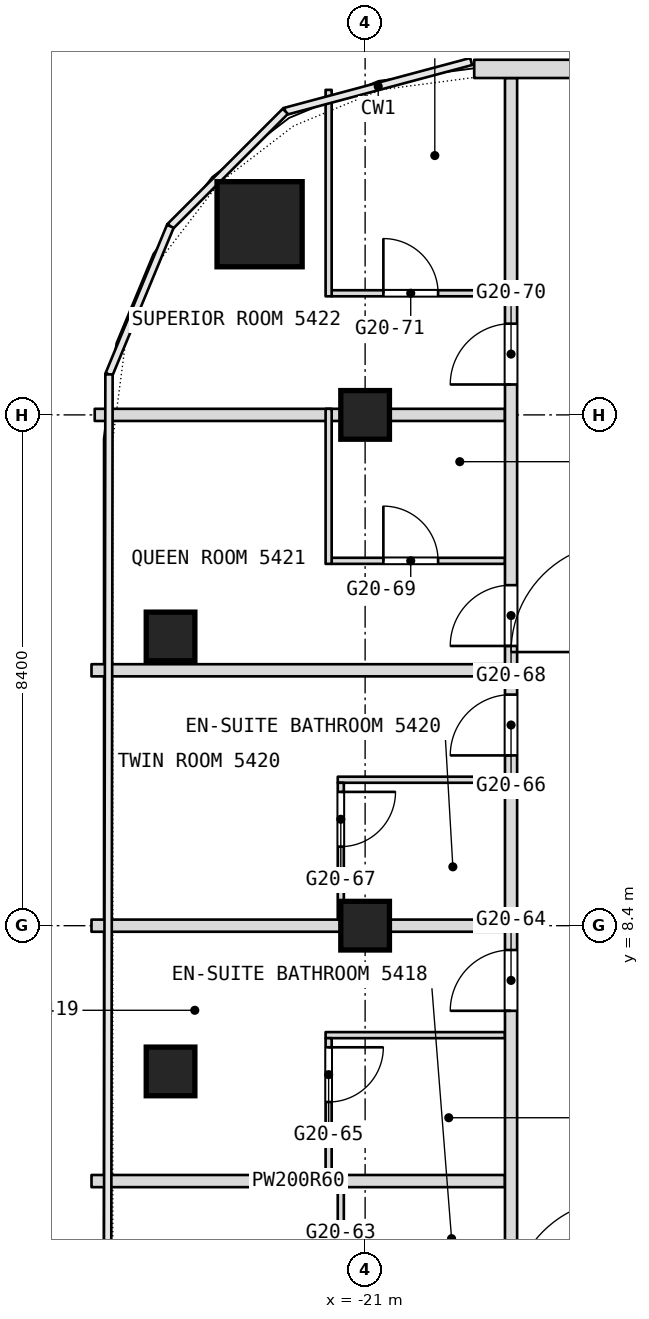
"""IFC4 building model, lengths in metres.
Left out: names, types, materials, properties, quantities, classifications, styles, units other than length and angle.
Written with IfcOpenShell. Run it as: python <this file> out.ifc"""

import sys

from ifc_helpers import new_model, si_unit, direction, frame, frame_2d, origin, origin_2d, place, context, subcontext, project, spatial, rectangle, extrude, element, fill, save


model = new_model("IFC4")
c1 = context("Model", 3, precision=1e-05, world=origin(), true_north=direction((0.0, 1.0)))
c2 = subcontext(c1, "Body", "Model", "MODEL_VIEW")
j1 = project(units=[si_unit("LENGTHUNIT", "METRE"), si_unit("PLANEANGLEUNIT", "RADIAN")], contexts=[c1])
p1 = place(None, origin())
s1 = spatial("IfcSite", under=j1, at=p1, CompositionType="ELEMENT")
p2 = place(p1, origin())
s2 = spatial("IfcBuilding", under=s1, at=p2, CompositionType="ELEMENT")
p3 = place(p2, frame((0.0, 0.0, 230.9)))
s3 = spatial("IfcBuildingStorey", under=s2, at=p3, CompositionType="ELEMENT", Elevation=230.9)
p4 = place(p3, frame((-22.736, 19.936, 0.0), z_axis=(0.0, 0.0, 1.0), x_axis=(1.0, 0.0, 0.0)))
e1 = element("IfcColumn", 1, at=p4, inside=s3, PredefinedType="COLUMN", context=c2, shape_type="SweptSolid", body=[
    extrude(rectangle(XDim=1.4, YDim=1.4, at=origin_2d()), origin(), (0.0, 0.0, 1.0), 3.6),
])
for number, where, z_axis, x_axis in (
    (2, (-21.0, 8.4, 0.0), (0.0, 0.0, 1.0), (1.0, 0.0, 0.0)),
    (3, (-21.0, 16.8, 0.0), (0.0, 0.0, 1.0), (1.0, 0.0, 0.0)),
    (4, (-24.2, 6.003, 0.0), (0.0, 0.0, 1.0), (1.0, 0.0, 0.0)),
    (5, (-24.2, 13.156, 0.0), (0.0, 0.0, 1.0), (1.0, 0.0, 0.0)),
):
    element("IfcColumn", number, at=place(p3, frame(where, z_axis=z_axis, x_axis=x_axis)), inside=s3, PredefinedType="COLUMN", context=c2, shape_type="SweptSolid", body=[
        extrude(rectangle(XDim=0.8, YDim=0.8, at=origin_2d()), origin(), (0.0, 0.0, 1.0), 3.6),
    ])
p5 = place(p3, frame((-25.5, 4.2, 0.0), z_axis=(0.0, 0.0, 1.0), x_axis=(1.0, 0.0, 0.0)))
e6 = element("IfcWall", 6, at=p5, inside=s3, PredefinedType="PARTITIONING", context=c2, shape_type="SweptSolid", body=[
    extrude(rectangle(XDim=6.8, YDim=0.2, at=frame_2d((3.4, 0.0))), origin(), (0.0, 0.0, 1.0), 3.34),
])
p6 = place(p3, frame((-21.65, 6.6, 0.0), z_axis=(0.0, 0.0, 1.0), x_axis=(1.0, 0.0, 0.0)))
e7 = element("IfcWall", 7, at=p6, inside=s3, PredefinedType="PARTITIONING", context=c2, shape_type="SweptSolid", body=[
    extrude(rectangle(XDim=2.95, YDim=0.1, at=frame_2d((1.475, 0.0))), origin(), (0.0, 0.0, 1.0), 3.34),
])
p7 = place(p3, frame((-25.5, 8.4, 0.0), z_axis=(0.0, 0.0, 1.0), x_axis=(1.0, 0.0, 0.0)))
e8 = element("IfcWall", 8, at=p7, inside=s3, PredefinedType="PARTITIONING", context=c2, shape_type="SweptSolid", body=[
    extrude(rectangle(XDim=6.8, YDim=0.2, at=frame_2d((3.4, 0.0))), origin(), (0.0, 0.0, 1.0), 2.94),
])
p8 = place(p3, frame((-21.45, 10.8, 0.0), z_axis=(0.0, 0.0, 1.0), x_axis=(1.0, 0.0, 0.0)))
e9 = element("IfcWall", 9, at=p8, inside=s3, PredefinedType="PARTITIONING", context=c2, shape_type="SweptSolid", body=[
    extrude(rectangle(XDim=2.75, YDim=0.1, at=frame_2d((1.375, 0.0))), origin(), (0.0, 0.0, 1.0), 3.34),
])
p9 = place(p3, frame((-25.5, 12.6, 0.0), z_axis=(0.0, 0.0, 1.0), x_axis=(1.0, 0.0, 0.0)))
e10 = element("IfcWall", 10, at=p9, inside=s3, PredefinedType="PARTITIONING", context=c2, shape_type="SweptSolid", body=[
    extrude(rectangle(XDim=6.8, YDim=0.2, at=frame_2d((3.4, 0.0))), origin(), (0.0, 0.0, 1.0), 3.34),
])
p10 = place(p3, frame((-21.55, 14.4, 0.0), z_axis=(0.0, 0.0, 1.0), x_axis=(1.0, 0.0, 0.0)))
e11 = element("IfcWall", 11, at=p10, inside=s3, PredefinedType="PARTITIONING", context=c2, shape_type="SweptSolid", body=[
    extrude(rectangle(XDim=2.85, YDim=0.1, at=frame_2d((1.425, 0.0))), origin(), (0.0, 0.0, 1.0), 3.34),
])
p11 = place(p10, frame((0.85, 0.0, 0.0)))
e12 = element("IfcOpeningElement", 12, at=p11, cuts=e11, PredefinedType="OPENING", context=c2, shape_type="SweptSolid", body=[
    extrude(rectangle(XDim=0.9, YDim=2.1, at=frame_2d((0.45, 1.05))), frame((0.0, 0.05, 0.0), z_axis=(0.0, -1.0, 0.0), x_axis=(1.0, 0.0, 0.0)), (0.0, 0.0, 1.0), 0.1),
])
p12 = place(p3, frame((-25.447, 16.8, 0.0), z_axis=(0.0, 0.0, 1.0), x_axis=(1.0, 0.0, 0.0)))
e13 = element("IfcWall", 13, at=p12, inside=s3, PredefinedType="PARTITIONING", context=c2, shape_type="SweptSolid", body=[
    extrude(rectangle(XDim=6.747, YDim=0.2, at=frame_2d((3.374, 0.0))), origin(), (0.0, 0.0, 1.0), 2.94),
])
p13 = place(p3, frame((-18.6, -26.751, 0.0), z_axis=(0.0, 0.0, 1.0), x_axis=(0.0, 1.0, 0.0)))
e14 = element("IfcWall", 14, at=p13, inside=s3, PredefinedType="PARTITIONING", context=c2, shape_type="SweptSolid", body=[
    extrude(rectangle(XDim=49.091, YDim=0.2, at=frame_2d((24.545, 0.0))), origin(), (0.0, 0.0, 1.0), 3.34),
])
p14 = place(p13, frame((3.413, 0.0, 0.0)))
e15 = element("IfcOpeningElement", 15, at=p14, cuts=e14, PredefinedType="OPENING", context=c2, shape_type="SweptSolid", body=[
    extrude(rectangle(XDim=1.0, YDim=2.1, at=frame_2d((0.5, 1.05))), frame((0.0, 0.1, 0.0), z_axis=(0.0, -1.0, 0.0), x_axis=(1.0, 0.0, 0.0)), (0.0, 0.0, 1.0), 0.2),
])
p15 = place(p13, frame((5.838, 0.0, 0.0)))
e16 = element("IfcOpeningElement", 16, at=p15, cuts=e14, PredefinedType="OPENING", context=c2, shape_type="SweptSolid", body=[
    extrude(rectangle(XDim=1.0, YDim=2.1, at=frame_2d((0.5, 1.05))), frame((0.0, 0.1, 0.0), z_axis=(0.0, -1.0, 0.0), x_axis=(1.0, 0.0, 0.0)), (0.0, 0.0, 1.0), 0.2),
])
p16 = place(p13, frame((13.551, 0.0, 0.0)))
e17 = element("IfcOpeningElement", 17, at=p16, cuts=e14, PredefinedType="OPENING", context=c2, shape_type="SweptSolid", body=[
    extrude(rectangle(XDim=1.1, YDim=2.1, at=frame_2d((0.55, 1.05))), frame((0.0, 0.1, 0.0), z_axis=(0.0, -1.0, 0.0), x_axis=(1.0, 0.0, 0.0)), (0.0, 0.0, 1.0), 0.2),
])
p17 = place(p13, frame((22.051, 0.0, 0.0)))
e18 = element("IfcOpeningElement", 18, at=p17, cuts=e14, PredefinedType="OPENING", context=c2, shape_type="SweptSolid", body=[
    extrude(rectangle(XDim=1.1, YDim=2.1, at=frame_2d((0.55, 1.05))), frame((0.0, 0.1, 0.0), z_axis=(0.0, -1.0, 0.0), x_axis=(1.0, 0.0, 0.0)), (0.0, 0.0, 1.0), 0.2),
])
p18 = place(p13, frame((27.151, 0.0, 0.0)))
e19 = element("IfcOpeningElement", 19, at=p18, cuts=e14, PredefinedType="OPENING", context=c2, shape_type="SweptSolid", body=[
    extrude(rectangle(XDim=1.0, YDim=2.1, at=frame_2d((0.5, 1.05))), frame((0.0, 0.1, 0.0), z_axis=(0.0, -1.0, 0.0), x_axis=(1.0, 0.0, 0.0)), (0.0, 0.0, 1.0), 0.2),
])
p19 = place(p13, frame((33.751, 0.0, 0.0)))
e20 = element("IfcOpeningElement", 20, at=p19, cuts=e14, PredefinedType="OPENING", context=c2, shape_type="SweptSolid", body=[
    extrude(rectangle(XDim=1.0, YDim=2.1, at=frame_2d((0.5, 1.05))), frame((0.0, 0.1, 0.0), z_axis=(0.0, -1.0, 0.0), x_axis=(1.0, 0.0, 0.0)), (0.0, 0.0, 1.0), 0.2),
])
p20 = place(p13, frame((37.951, 0.0, 0.0)))
e21 = element("IfcOpeningElement", 21, at=p20, cuts=e14, PredefinedType="OPENING", context=c2, shape_type="SweptSolid", body=[
    extrude(rectangle(XDim=1.0, YDim=2.1, at=frame_2d((0.5, 1.05))), frame((0.0, 0.1, 0.0), z_axis=(0.0, -1.0, 0.0), x_axis=(1.0, 0.0, 0.0)), (0.0, 0.0, 1.0), 0.2),
])
p21 = place(p13, frame((39.751, 0.0, 0.0)))
e22 = element("IfcOpeningElement", 22, at=p21, cuts=e14, PredefinedType="OPENING", context=c2, shape_type="SweptSolid", body=[
    extrude(rectangle(XDim=1.0, YDim=2.1, at=frame_2d((0.5, 1.05))), frame((0.0, 0.1, 0.0), z_axis=(0.0, -1.0, 0.0), x_axis=(1.0, 0.0, 0.0)), (0.0, 0.0, 1.0), 0.2),
])
p22 = place(p13, frame((44.051, 0.0, 0.0)))
e23 = element("IfcOpeningElement", 23, at=p22, cuts=e14, PredefinedType="OPENING", context=c2, shape_type="SweptSolid", body=[
    extrude(rectangle(XDim=1.0, YDim=2.1, at=frame_2d((0.5, 1.05))), frame((0.0, 0.1, 0.0), z_axis=(0.0, -1.0, 0.0), x_axis=(1.0, 0.0, 0.0)), (0.0, 0.0, 1.0), 0.2),
])
p23 = place(p3, frame((-21.55, 18.8, 0.0), z_axis=(0.0, 0.0, 1.0), x_axis=(1.0, 0.0, 0.0)))
e24 = element("IfcWall", 24, at=p23, inside=s3, PredefinedType="PARTITIONING", context=c2, shape_type="SweptSolid", body=[
    extrude(rectangle(XDim=2.85, YDim=0.1, at=frame_2d((1.425, 0.0))), origin(), (0.0, 0.0, 1.0), 3.34),
])
p24 = place(p23, frame((0.85, 0.0, 0.0)))
e25 = element("IfcOpeningElement", 25, at=p24, cuts=e24, PredefinedType="OPENING", context=c2, shape_type="SweptSolid", body=[
    extrude(rectangle(XDim=0.9, YDim=2.1, at=frame_2d((0.45, 1.05))), frame((0.0, 0.05, 0.0), z_axis=(0.0, -1.0, 0.0), x_axis=(1.0, 0.0, 0.0)), (0.0, 0.0, 1.0), 0.1),
])
p25 = place(p3, frame((-21.4, 1.75, 0.0), z_axis=(0.0, 0.0, 1.0), x_axis=(0.0, 1.0, 0.0)))
e26 = element("IfcWall", 26, at=p25, inside=s3, PredefinedType="PARTITIONING", context=c2, shape_type="SweptSolid", body=[
    extrude(rectangle(XDim=2.55, YDim=0.1, at=frame_2d((1.275, 0.0))), origin(), (0.0, 0.0, 1.0), 3.34),
])
p26 = place(p25, frame((0.15, 0.0, 0.0)))
e27 = element("IfcOpeningElement", 27, at=p26, cuts=e26, PredefinedType="OPENING", context=c2, shape_type="SweptSolid", body=[
    extrude(rectangle(XDim=0.9, YDim=2.1, at=frame_2d((0.45, 1.05))), frame((0.0, 0.05, 0.0), z_axis=(0.0, -1.0, 0.0), x_axis=(1.0, 0.0, 0.0)), (0.0, 0.0, 1.0), 0.1),
])
p27 = place(p3, frame((-21.4, 8.5, 0.0), z_axis=(0.0, 0.0, 1.0), x_axis=(0.0, 1.0, 0.0)))
e28 = element("IfcWall", 28, at=p27, inside=s3, PredefinedType="PARTITIONING", context=c2, shape_type="SweptSolid", body=[
    extrude(rectangle(XDim=2.25, YDim=0.1, at=frame_2d((1.125, 0.0))), origin(), (0.0, 0.0, 1.0), 3.34),
])
p28 = place(p27, frame((1.2, 0.0, 0.0)))
e29 = element("IfcOpeningElement", 29, at=p28, cuts=e28, PredefinedType="OPENING", context=c2, shape_type="SweptSolid", body=[
    extrude(rectangle(XDim=0.9, YDim=2.1, at=frame_2d((0.45, 1.05))), frame((0.0, 0.05, 0.0), z_axis=(0.0, -1.0, 0.0), x_axis=(1.0, 0.0, 0.0)), (0.0, 0.0, 1.0), 0.1),
])
p29 = place(p3, frame((-21.6, 4.3, 0.0), z_axis=(0.0, 0.0, 1.0), x_axis=(0.0, 1.0, 0.0)))
e30 = element("IfcWall", 30, at=p29, inside=s3, PredefinedType="PARTITIONING", context=c2, shape_type="SweptSolid", body=[
    extrude(rectangle(XDim=2.25, YDim=0.1, at=frame_2d((1.125, 0.0))), origin(), (0.0, 0.0, 1.0), 3.34),
])
p30 = place(p29, frame((1.2, 0.0, 0.0)))
e31 = element("IfcOpeningElement", 31, at=p30, cuts=e30, PredefinedType="OPENING", context=c2, shape_type="SweptSolid", body=[
    extrude(rectangle(XDim=0.9, YDim=2.1, at=frame_2d((0.45, 1.05))), frame((0.0, 0.05, 0.0), z_axis=(0.0, -1.0, 0.0), x_axis=(1.0, 0.0, 0.0)), (0.0, 0.0, 1.0), 0.1),
])
p31 = place(p3, frame((-21.6, 14.35, 0.0), z_axis=(0.0, 0.0, 1.0), x_axis=(0.0, 1.0, 0.0)))
e32 = element("IfcWall", 32, at=p31, inside=s3, PredefinedType="PARTITIONING", context=c2, shape_type="SweptSolid", body=[
    extrude(rectangle(XDim=2.55, YDim=0.1, at=frame_2d((1.275, 0.0))), origin(), (0.0, 0.0, 1.0), 3.34),
])
p32 = place(p3, frame((-21.6, 18.75, 0.0), z_axis=(0.0, 0.0, 1.0), x_axis=(0.0, 1.0, 0.0)))
e33 = element("IfcWall", 33, at=p32, inside=s3, PredefinedType="PARTITIONING", context=c2, shape_type="SweptSolid", body=[
    extrude(rectangle(XDim=3.395, YDim=0.1, at=frame_2d((1.698, 0.0))), origin(), (0.0, 0.0, 1.0), 3.34),
])
p33 = place(p3, frame((19.206, 22.49, 0.0), z_axis=(0.0, 0.0, 1.0), x_axis=(-1.0, 0.0, 0.0)))
e34 = element("IfcWall", 34, at=p33, inside=s3, PredefinedType="NOTDEFINED", context=c2, shape_type="SweptSolid", body=[
    extrude(rectangle(XDim=38.412, YDim=0.3, at=frame_2d((19.206, 0.0))), origin(), (0.0, 0.0, 1.0), 3.6),
])
p34 = place(p33, frame((3.306, 0.0, 0.9)))
e35 = element("IfcOpeningElement", 35, at=p34, cuts=e34, PredefinedType="OPENING", context=c2, shape_type="SweptSolid", body=[
    extrude(rectangle(XDim=2.4, YDim=2.1, at=frame_2d((1.2, 1.05))), frame((0.0, 0.15, 0.0), z_axis=(0.0, -1.0, 0.0), x_axis=(1.0, 0.0, 0.0)), (0.0, 0.0, 1.0), 0.3),
])
p35 = place(p33, frame((7.506, 0.0, 0.9)))
e36 = element("IfcOpeningElement", 36, at=p35, cuts=e34, PredefinedType="OPENING", context=c2, shape_type="SweptSolid", body=[
    extrude(rectangle(XDim=2.4, YDim=2.1, at=frame_2d((1.2, 1.05))), frame((0.0, 0.15, 0.0), z_axis=(0.0, -1.0, 0.0), x_axis=(1.0, 0.0, 0.0)), (0.0, 0.0, 1.0), 0.3),
])
p36 = place(p33, frame((11.706, 0.0, 0.9)))
e37 = element("IfcOpeningElement", 37, at=p36, cuts=e34, PredefinedType="OPENING", context=c2, shape_type="SweptSolid", body=[
    extrude(rectangle(XDim=2.4, YDim=2.1, at=frame_2d((1.2, 1.05))), frame((0.0, 0.15, 0.0), z_axis=(0.0, -1.0, 0.0), x_axis=(1.0, 0.0, 0.0)), (0.0, 0.0, 1.0), 0.3),
])
p37 = place(p33, frame((15.906, 0.0, 0.9)))
e38 = element("IfcOpeningElement", 38, at=p37, cuts=e34, PredefinedType="OPENING", context=c2, shape_type="SweptSolid", body=[
    extrude(rectangle(XDim=2.4, YDim=2.1, at=frame_2d((1.2, 1.05))), frame((0.0, 0.15, 0.0), z_axis=(0.0, -1.0, 0.0), x_axis=(1.0, 0.0, 0.0)), (0.0, 0.0, 1.0), 0.3),
])
p38 = place(p33, frame((20.106, 0.0, 0.9)))
e39 = element("IfcOpeningElement", 39, at=p38, cuts=e34, PredefinedType="OPENING", context=c2, shape_type="SweptSolid", body=[
    extrude(rectangle(XDim=2.4, YDim=2.1, at=frame_2d((1.2, 1.05))), frame((0.0, 0.15, 0.0), z_axis=(0.0, -1.0, 0.0), x_axis=(1.0, 0.0, 0.0)), (0.0, 0.0, 1.0), 0.3),
])
p39 = place(p33, frame((24.306, 0.0, 0.9)))
e40 = element("IfcOpeningElement", 40, at=p39, cuts=e34, PredefinedType="OPENING", context=c2, shape_type="SweptSolid", body=[
    extrude(rectangle(XDim=2.4, YDim=2.1, at=frame_2d((1.2, 1.05))), frame((0.0, 0.15, 0.0), z_axis=(0.0, -1.0, 0.0), x_axis=(1.0, 0.0, 0.0)), (0.0, 0.0, 1.0), 0.3),
])
p40 = place(p33, frame((28.506, 0.0, 0.9)))
e41 = element("IfcOpeningElement", 41, at=p40, cuts=e34, PredefinedType="OPENING", context=c2, shape_type="SweptSolid", body=[
    extrude(rectangle(XDim=2.4, YDim=2.1, at=frame_2d((1.2, 1.05))), frame((0.0, 0.15, 0.0), z_axis=(0.0, -1.0, 0.0), x_axis=(1.0, 0.0, 0.0)), (0.0, 0.0, 1.0), 0.3),
])
p41 = place(p33, frame((32.706, 0.0, 0.9)))
e42 = element("IfcOpeningElement", 42, at=p41, cuts=e34, PredefinedType="OPENING", context=c2, shape_type="SweptSolid", body=[
    extrude(rectangle(XDim=2.4, YDim=2.1, at=frame_2d((1.2, 1.05))), frame((0.0, 0.15, 0.0), z_axis=(0.0, -1.0, 0.0), x_axis=(1.0, 0.0, 0.0)), (0.0, 0.0, 1.0), 0.3),
])
p42 = place(p11, origin())
e43 = element("IfcDoor", 43, at=p42, inside=s3, OperationType="SINGLE_SWING_LEFT", PredefinedType="DOOR", context=c2, shape_type="SweptSolid", body=[
    extrude(rectangle(XDim=0.9, YDim=2.1, at=frame_2d((0.45, 1.05))), frame((0.0, 0.025, 0.0), z_axis=(0.0, -1.0, 0.0), x_axis=(1.0, 0.0, 0.0)), (0.0, 0.0, 1.0), 0.05),
])
fill(e12, e43)
p43 = place(p19, origin())
e44 = element("IfcDoor", 44, at=p43, inside=s3, OperationType="SINGLE_SWING_LEFT", PredefinedType="DOOR", context=c2, shape_type="SweptSolid", body=[
    extrude(rectangle(XDim=1.0, YDim=2.1, at=frame_2d((0.5, 1.05))), frame((0.0, 0.025, 0.0), z_axis=(0.0, -1.0, 0.0), x_axis=(1.0, 0.0, 0.0)), (0.0, 0.0, 1.0), 0.05),
])
fill(e20, e44)
p44 = place(p20, origin())
e45 = element("IfcDoor", 45, at=p44, inside=s3, OperationType="SINGLE_SWING_LEFT", PredefinedType="DOOR", context=c2, shape_type="SweptSolid", body=[
    extrude(rectangle(XDim=1.0, YDim=2.1, at=frame_2d((0.5, 1.05))), frame((0.0, 0.025, 0.0), z_axis=(0.0, -1.0, 0.0), x_axis=(1.0, 0.0, 0.0)), (0.0, 0.0, 1.0), 0.05),
])
fill(e21, e45)
p45 = place(p21, origin())
e46 = element("IfcDoor", 46, at=p45, inside=s3, OperationType="SINGLE_SWING_LEFT", PredefinedType="DOOR", context=c2, shape_type="SweptSolid", body=[
    extrude(rectangle(XDim=1.0, YDim=2.1, at=frame_2d((0.5, 1.05))), frame((0.0, 0.025, 0.0), z_axis=(0.0, -1.0, 0.0), x_axis=(1.0, 0.0, 0.0)), (0.0, 0.0, 1.0), 0.05),
])
fill(e22, e46)
p46 = place(p22, origin())
e47 = element("IfcDoor", 47, at=p46, inside=s3, OperationType="SINGLE_SWING_LEFT", PredefinedType="DOOR", context=c2, shape_type="SweptSolid", body=[
    extrude(rectangle(XDim=1.0, YDim=2.1, at=frame_2d((0.5, 1.05))), frame((0.0, 0.025, 0.0), z_axis=(0.0, -1.0, 0.0), x_axis=(1.0, 0.0, 0.0)), (0.0, 0.0, 1.0), 0.05),
])
fill(e23, e47)
p47 = place(p24, origin())
e48 = element("IfcDoor", 48, at=p47, inside=s3, OperationType="SINGLE_SWING_LEFT", PredefinedType="DOOR", context=c2, shape_type="SweptSolid", body=[
    extrude(rectangle(XDim=0.9, YDim=2.1, at=frame_2d((0.45, 1.05))), frame((0.0, 0.025, 0.0), z_axis=(0.0, -1.0, 0.0), x_axis=(1.0, 0.0, 0.0)), (0.0, 0.0, 1.0), 0.05),
])
fill(e25, e48)
p48 = place(p28, origin())
e49 = element("IfcDoor", 49, at=p48, inside=s3, OperationType="SINGLE_SWING_LEFT", PredefinedType="DOOR", context=c2, shape_type="SweptSolid", body=[
    extrude(rectangle(XDim=0.9, YDim=2.1, at=frame_2d((0.45, 1.05))), frame((0.0, 0.025, 0.0), z_axis=(0.0, -1.0, 0.0), x_axis=(1.0, 0.0, 0.0)), (0.0, 0.0, 1.0), 0.05),
])
fill(e29, e49)
p49 = place(p30, origin())
e50 = element("IfcDoor", 50, at=p49, inside=s3, OperationType="SINGLE_SWING_LEFT", PredefinedType="DOOR", context=c2, shape_type="SweptSolid", body=[
    extrude(rectangle(XDim=0.9, YDim=2.1, at=frame_2d((0.45, 1.05))), frame((0.0, 0.025, 0.0), z_axis=(0.0, -1.0, 0.0), x_axis=(1.0, 0.0, 0.0)), (0.0, 0.0, 1.0), 0.05),
])
fill(e31, e50)
save(model, sys.argv[1])
